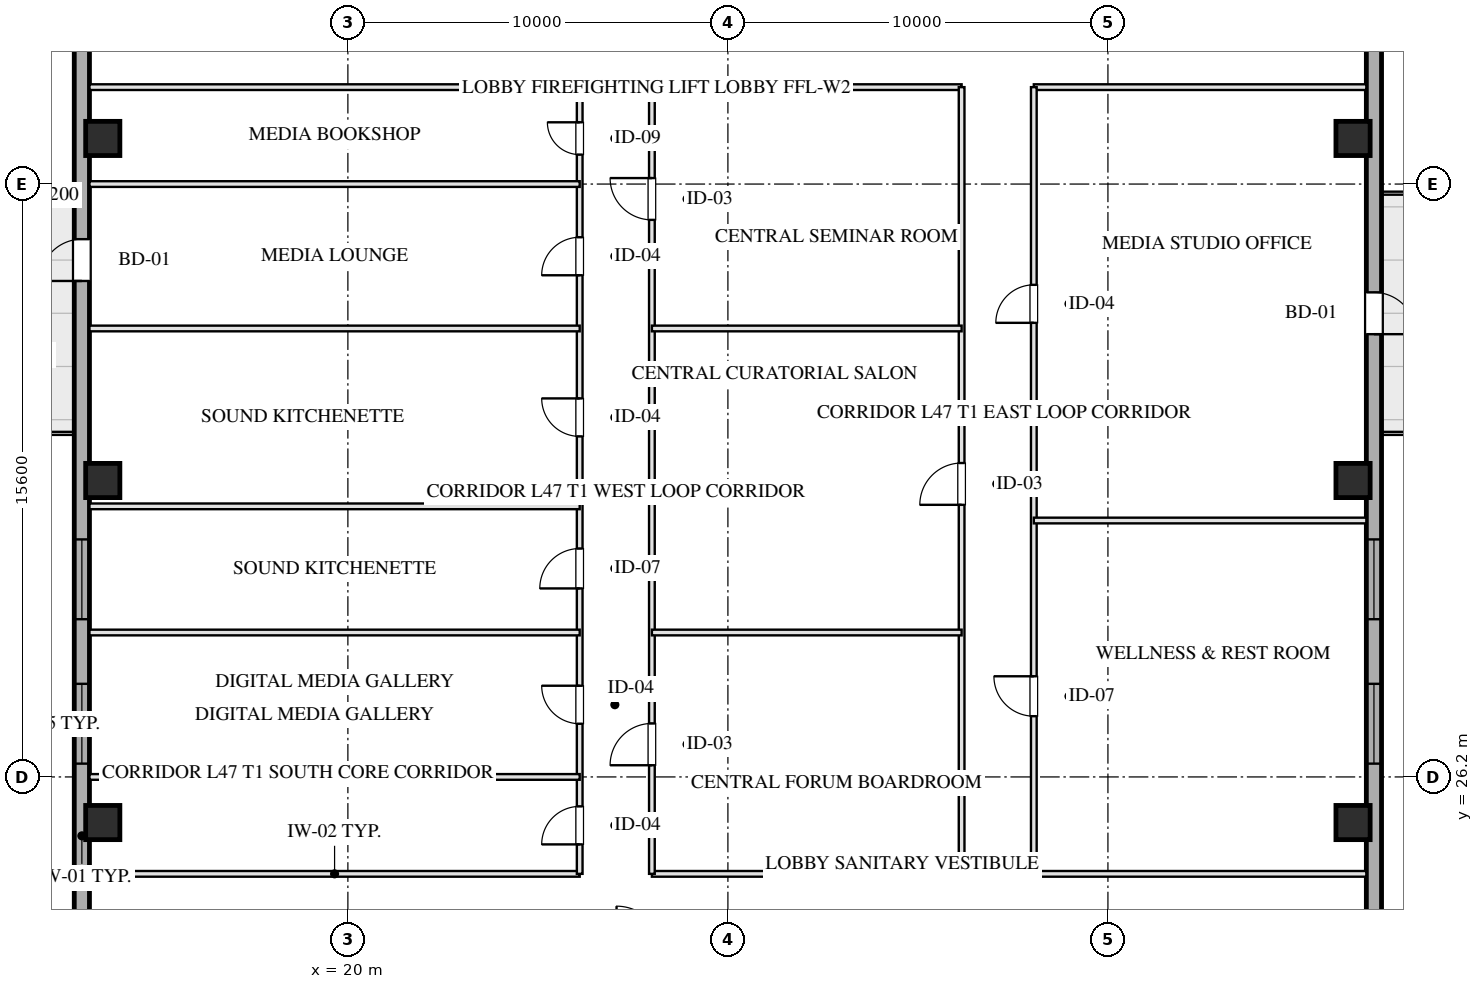
"""IFC4 building model, lengths in metres.
Left out: names, types, materials, properties, quantities, classifications, styles, units other than length and angle.
Written with IfcOpenShell. Run it as: python <this file> out.ifc"""

import sys

from ifc_helpers import new_model, si_unit, direction, frame, frame_2d, origin, origin_2d, place, context, subcontext, project, spatial, rectangle, hollow_rectangle, extrude, element, fill, save


model = new_model("IFC4")
c1 = context("Model", 3, precision=1e-05, world=origin(), true_north=direction((0.0, 1.0)))
c2 = subcontext(c1, "Body", "Model", "MODEL_VIEW")
j1 = project(units=[si_unit("LENGTHUNIT", "METRE"), si_unit("PLANEANGLEUNIT", "RADIAN")], contexts=[c1])
p1 = place(None, origin())
s1 = spatial("IfcSite", under=j1, at=p1, CompositionType="ELEMENT")
p2 = place(p1, origin())
s2 = spatial("IfcBuilding", under=s1, at=p2, CompositionType="ELEMENT")
p3 = place(p2, frame((0.0, 0.0, 177.1)))
s3 = spatial("IfcBuildingStorey", under=s2, at=p3, CompositionType="ELEMENT", Elevation=177.1)
for number, where, z_axis, x_axis in (
    (1, (13.55, 25.0, 0.0), (0.0, 0.0, 1.0), (1.0, 0.0, 0.0)),
    (2, (13.55, 34.0, 0.0), (0.0, 0.0, 1.0), (1.0, 0.0, 0.0)),
    (3, (13.55, 43.0, 0.0), (0.0, 0.0, 1.0), (1.0, 0.0, 0.0)),
    (4, (46.45, 25.0, 0.0), (0.0, 0.0, 1.0), (1.0, 0.0, 0.0)),
    (5, (46.45, 34.0, 0.0), (0.0, 0.0, 1.0), (1.0, 0.0, 0.0)),
    (6, (46.45, 43.0, 0.0), (0.0, 0.0, 1.0), (1.0, 0.0, 0.0)),
):
    element("IfcColumn", number, at=place(p3, frame(where, z_axis=z_axis, x_axis=x_axis)), inside=s3, PredefinedType="COLUMN", context=c2, shape_type="SweptSolid", body=[
        extrude(hollow_rectangle(XDim=0.9, YDim=0.9, WallThickness=0.032, at=origin_2d()), origin(), (0.0, 0.0, 1.0), 3.451),
    ])
p4 = place(p3, frame((13.0, 10.8, 0.0), z_axis=(0.0, 0.0, 1.0), x_axis=(0.0, 1.0, 0.0)))
e7 = element("IfcWall", 7, at=p4, inside=s3, PredefinedType="SOLIDWALL", context=c2, shape_type="SweptSolid", body=[
    extrude(rectangle(XDim=46.4, YDim=0.4, at=frame_2d((23.2, 0.0))), origin(), (0.0, 0.0, 1.0), 2.61),
])
p5 = place(p4, frame((15.75, 0.0, 0.75)))
e8 = element("IfcOpeningElement", 8, at=p5, cuts=e7, PredefinedType="OPENING", context=c2, shape_type="SweptSolid", body=[
    extrude(rectangle(XDim=2.1, YDim=1.46, at=frame_2d((1.05, 0.73))), frame((0.0, 0.21, 0.0), z_axis=(0.0, -1.0, 0.0), x_axis=(1.0, 0.0, 0.0)), (0.0, 0.0, 1.0), 0.42),
])
p6 = place(p4, frame((19.55, 0.0, 0.75)))
e9 = element("IfcOpeningElement", 9, at=p6, cuts=e7, PredefinedType="OPENING", context=c2, shape_type="SweptSolid", body=[
    extrude(rectangle(XDim=2.1, YDim=1.46, at=frame_2d((1.05, 0.73))), frame((0.0, 0.21, 0.0), z_axis=(0.0, -1.0, 0.0), x_axis=(1.0, 0.0, 0.0)), (0.0, 0.0, 1.0), 0.42),
])
p7 = place(p4, frame((28.45, 0.0, 0.0)))
e10 = element("IfcOpeningElement", 10, at=p7, cuts=e7, PredefinedType="OPENING", context=c2, shape_type="SweptSolid", body=[
    extrude(rectangle(XDim=1.1, YDim=2.15, at=frame_2d((0.55, 1.075))), frame((0.0, 0.21, 0.0), z_axis=(0.0, -1.0, 0.0), x_axis=(1.0, 0.0, 0.0)), (0.0, 0.0, 1.0), 0.42),
])
p8 = place(p3, frame((47.0, 57.2, 0.0), z_axis=(0.0, 0.0, 1.0), x_axis=(0.0, -1.0, 0.0)))
e11 = element("IfcWall", 11, at=p8, inside=s3, PredefinedType="SOLIDWALL", context=c2, shape_type="SweptSolid", body=[
    extrude(rectangle(XDim=46.4, YDim=0.4, at=frame_2d((23.2, 0.0))), origin(), (0.0, 0.0, 1.0), 2.61),
])
p9 = place(p8, frame((28.55, 0.0, 0.75)))
e12 = element("IfcOpeningElement", 12, at=p9, cuts=e11, PredefinedType="OPENING", context=c2, shape_type="SweptSolid", body=[
    extrude(rectangle(XDim=2.1, YDim=1.46, at=frame_2d((1.05, 0.73))), frame((0.0, 0.21, 0.0), z_axis=(0.0, -1.0, 0.0), x_axis=(1.0, 0.0, 0.0)), (0.0, 0.0, 1.0), 0.42),
])
p10 = place(p8, frame((24.75, 0.0, 0.75)))
e13 = element("IfcOpeningElement", 13, at=p10, cuts=e11, PredefinedType="OPENING", context=c2, shape_type="SweptSolid", body=[
    extrude(rectangle(XDim=2.1, YDim=1.46, at=frame_2d((1.05, 0.73))), frame((0.0, 0.21, 0.0), z_axis=(0.0, -1.0, 0.0), x_axis=(1.0, 0.0, 0.0)), (0.0, 0.0, 1.0), 0.42),
])
p11 = place(p8, frame((18.25, 0.0, 0.0)))
e14 = element("IfcOpeningElement", 14, at=p11, cuts=e11, PredefinedType="OPENING", context=c2, shape_type="SweptSolid", body=[
    extrude(rectangle(XDim=1.1, YDim=2.15, at=frame_2d((0.55, 1.075))), frame((0.0, 0.21, 0.0), z_axis=(0.0, -1.0, 0.0), x_axis=(1.0, 0.0, 0.0)), (0.0, 0.0, 1.0), 0.42),
])
p12 = place(p3, frame((13.2, 23.65, 0.0), z_axis=(0.0, 0.0, 1.0), x_axis=(1.0, 0.0, 0.0)))
e15 = element("IfcWall", 15, at=p12, inside=s3, PredefinedType="PARTITIONING", context=c2, shape_type="SweptSolid", body=[
    extrude(rectangle(XDim=12.9, YDim=0.15, at=frame_2d((6.45, 0.0))), origin(), (0.0, 0.0, 1.0), 3.175),
])
p13 = place(p3, frame((28.0, 23.65, 0.0), z_axis=(0.0, 0.0, 1.0), x_axis=(1.0, 0.0, 0.0)))
e16 = element("IfcWall", 16, at=p13, inside=s3, PredefinedType="PARTITIONING", context=c2, shape_type="SweptSolid", body=[
    extrude(rectangle(XDim=8.15, YDim=0.15, at=frame_2d((4.075, 0.0))), origin(), (0.0, 0.0, 1.0), 3.175),
])
p14 = place(p3, frame((38.05, 23.65, 0.0), z_axis=(0.0, 0.0, 1.0), x_axis=(1.0, 0.0, 0.0)))
e17 = element("IfcWall", 17, at=p14, inside=s3, PredefinedType="PARTITIONING", context=c2, shape_type="SweptSolid", body=[
    extrude(rectangle(XDim=8.75, YDim=0.15, at=frame_2d((4.375, 0.0))), origin(), (0.0, 0.0, 1.0), 3.175),
])
p15 = place(p3, frame((13.2, 44.35, 0.0), z_axis=(0.0, 0.0, 1.0), x_axis=(1.0, 0.0, 0.0)))
e18 = element("IfcWall", 18, at=p15, inside=s3, PredefinedType="PARTITIONING", context=c2, shape_type="SweptSolid", body=[
    extrude(rectangle(XDim=12.9, YDim=0.15, at=frame_2d((6.45, 0.0))), origin(), (0.0, 0.0, 1.0), 3.175),
])
p16 = place(p3, frame((28.0, 44.35, 0.0), z_axis=(0.0, 0.0, 1.0), x_axis=(1.0, 0.0, 0.0)))
e19 = element("IfcWall", 19, at=p16, inside=s3, PredefinedType="PARTITIONING", context=c2, shape_type="SweptSolid", body=[
    extrude(rectangle(XDim=8.15, YDim=0.15, at=frame_2d((4.075, 0.0))), origin(), (0.0, 0.0, 1.0), 3.175),
])
p17 = place(p3, frame((38.05, 44.35, 0.0), z_axis=(0.0, 0.0, 1.0), x_axis=(1.0, 0.0, 0.0)))
e20 = element("IfcWall", 20, at=p17, inside=s3, PredefinedType="PARTITIONING", context=c2, shape_type="SweptSolid", body=[
    extrude(rectangle(XDim=8.75, YDim=0.15, at=frame_2d((4.375, 0.0))), origin(), (0.0, 0.0, 1.0), 3.175),
])
p18 = place(p3, frame((26.1, 23.65, 0.0), z_axis=(0.0, 0.0, 1.0), x_axis=(0.0, 1.0, 0.0)))
e21 = element("IfcWall", 21, at=p18, inside=s3, PredefinedType="PARTITIONING", context=c2, shape_type="SweptSolid", body=[
    extrude(rectangle(XDim=20.7, YDim=0.15, at=frame_2d((10.35, 0.0))), origin(), (0.0, 0.0, 1.0), 3.175),
])
p19 = place(p18, frame((0.775, 0.0, 0.0)))
e22 = element("IfcOpeningElement", 22, at=p19, cuts=e21, PredefinedType="OPENING", context=c2, shape_type="SweptSolid", body=[
    extrude(rectangle(XDim=1.0, YDim=2.05, at=frame_2d((0.5, 1.025))), frame((0.0, 0.085, 0.0), z_axis=(0.0, -1.0, 0.0), x_axis=(1.0, 0.0, 0.0)), (0.0, 0.0, 1.0), 0.17),
])
p20 = place(p18, frame((3.95, 0.0, 0.0)))
e23 = element("IfcOpeningElement", 23, at=p20, cuts=e21, PredefinedType="OPENING", context=c2, shape_type="SweptSolid", body=[
    extrude(rectangle(XDim=1.0, YDim=2.05, at=frame_2d((0.5, 1.025))), frame((0.0, 0.085, 0.0), z_axis=(0.0, -1.0, 0.0), x_axis=(1.0, 0.0, 0.0)), (0.0, 0.0, 1.0), 0.17),
])
p21 = place(p18, frame((7.51, 0.0, 0.0)))
e24 = element("IfcOpeningElement", 24, at=p21, cuts=e21, PredefinedType="OPENING", context=c2, shape_type="SweptSolid", body=[
    extrude(rectangle(XDim=1.05, YDim=2.05, at=frame_2d((0.525, 1.025))), frame((0.0, 0.085, 0.0), z_axis=(0.0, -1.0, 0.0), x_axis=(1.0, 0.0, 0.0)), (0.0, 0.0, 1.0), 0.17),
])
p22 = place(p18, frame((11.51, 0.0, 0.0)))
e25 = element("IfcOpeningElement", 25, at=p22, cuts=e21, PredefinedType="OPENING", context=c2, shape_type="SweptSolid", body=[
    extrude(rectangle(XDim=1.0, YDim=2.05, at=frame_2d((0.5, 1.025))), frame((0.0, 0.085, 0.0), z_axis=(0.0, -1.0, 0.0), x_axis=(1.0, 0.0, 0.0)), (0.0, 0.0, 1.0), 0.17),
])
p23 = place(p18, frame((15.75, 0.0, 0.0)))
e26 = element("IfcOpeningElement", 26, at=p23, cuts=e21, PredefinedType="OPENING", context=c2, shape_type="SweptSolid", body=[
    extrude(rectangle(XDim=1.0, YDim=2.05, at=frame_2d((0.5, 1.025))), frame((0.0, 0.085, 0.0), z_axis=(0.0, -1.0, 0.0), x_axis=(1.0, 0.0, 0.0)), (0.0, 0.0, 1.0), 0.17),
])
p24 = place(p18, frame((18.925, 0.0, 0.0)))
e27 = element("IfcOpeningElement", 27, at=p24, cuts=e21, PredefinedType="OPENING", context=c2, shape_type="SweptSolid", body=[
    extrude(rectangle(XDim=0.85, YDim=2.05, at=frame_2d((0.425, 1.025))), frame((0.0, 0.085, 0.0), z_axis=(0.0, -1.0, 0.0), x_axis=(1.0, 0.0, 0.0)), (0.0, 0.0, 1.0), 0.17),
])
p25 = place(p3, frame((28.0, 23.65, 0.0), z_axis=(0.0, 0.0, 1.0), x_axis=(0.0, 1.0, 0.0)))
e28 = element("IfcWall", 28, at=p25, inside=s3, PredefinedType="PARTITIONING", context=c2, shape_type="SweptSolid", body=[
    extrude(rectangle(XDim=20.7, YDim=0.15, at=frame_2d((10.35, 0.0))), origin(), (0.0, 0.0, 1.0), 3.175),
])
p26 = place(p25, frame((2.857, 0.0, 0.0)))
e29 = element("IfcOpeningElement", 29, at=p26, cuts=e28, PredefinedType="OPENING", context=c2, shape_type="SweptSolid", body=[
    extrude(rectangle(XDim=1.1, YDim=2.05, at=frame_2d((0.55, 1.025))), frame((0.0, 0.085, 0.0), z_axis=(0.0, -1.0, 0.0), x_axis=(1.0, 0.0, 0.0)), (0.0, 0.0, 1.0), 0.17),
])
p27 = place(p25, frame((17.208, 0.0, 0.0)))
e30 = element("IfcOpeningElement", 30, at=p27, cuts=e28, PredefinedType="OPENING", context=c2, shape_type="SweptSolid", body=[
    extrude(rectangle(XDim=1.1, YDim=2.05, at=frame_2d((0.55, 1.025))), frame((0.0, 0.085, 0.0), z_axis=(0.0, -1.0, 0.0), x_axis=(1.0, 0.0, 0.0)), (0.0, 0.0, 1.0), 0.17),
])
p28 = place(p3, frame((36.15, 23.65, 0.0), z_axis=(0.0, 0.0, 1.0), x_axis=(0.0, 1.0, 0.0)))
e31 = element("IfcWall", 31, at=p28, inside=s3, PredefinedType="PARTITIONING", context=c2, shape_type="SweptSolid", body=[
    extrude(rectangle(XDim=20.7, YDim=0.15, at=frame_2d((10.35, 0.0))), origin(), (0.0, 0.0, 1.0), 3.175),
])
p29 = place(p28, frame((9.71, 0.0, 0.0)))
e32 = element("IfcOpeningElement", 32, at=p29, cuts=e31, PredefinedType="OPENING", context=c2, shape_type="SweptSolid", body=[
    extrude(rectangle(XDim=1.1, YDim=2.05, at=frame_2d((0.55, 1.025))), frame((0.0, 0.085, 0.0), z_axis=(0.0, -1.0, 0.0), x_axis=(1.0, 0.0, 0.0)), (0.0, 0.0, 1.0), 0.17),
])
p30 = place(p3, frame((38.05, 23.65, 0.0), z_axis=(0.0, 0.0, 1.0), x_axis=(0.0, 1.0, 0.0)))
e33 = element("IfcWall", 33, at=p30, inside=s3, PredefinedType="PARTITIONING", context=c2, shape_type="SweptSolid", body=[
    extrude(rectangle(XDim=20.7, YDim=0.15, at=frame_2d((10.35, 0.0))), origin(), (0.0, 0.0, 1.0), 3.175),
])
p31 = place(p30, frame((4.148, 0.0, 0.0)))
e34 = element("IfcOpeningElement", 34, at=p31, cuts=e33, PredefinedType="OPENING", context=c2, shape_type="SweptSolid", body=[
    extrude(rectangle(XDim=1.05, YDim=2.05, at=frame_2d((0.525, 1.025))), frame((0.0, 0.085, 0.0), z_axis=(0.0, -1.0, 0.0), x_axis=(1.0, 0.0, 0.0)), (0.0, 0.0, 1.0), 0.17),
])
p32 = place(p30, frame((14.499, 0.0, 0.0)))
e35 = element("IfcOpeningElement", 35, at=p32, cuts=e33, PredefinedType="OPENING", context=c2, shape_type="SweptSolid", body=[
    extrude(rectangle(XDim=1.0, YDim=2.05, at=frame_2d((0.5, 1.025))), frame((0.0, 0.085, 0.0), z_axis=(0.0, -1.0, 0.0), x_axis=(1.0, 0.0, 0.0)), (0.0, 0.0, 1.0), 0.17),
])
for number, where, z_axis, x_axis in (
    (36, (28.0, 30.0, 0.0), (0.0, 0.0, 1.0), (1.0, 0.0, 0.0)),
    (37, (28.0, 38.0, 0.0), (0.0, 0.0, 1.0), (1.0, 0.0, 0.0)),
):
    element("IfcWall", number, at=place(p3, frame(where, z_axis=z_axis, x_axis=x_axis)), inside=s3, PredefinedType="PARTITIONING", context=c2, shape_type="SweptSolid", body=[
        extrude(rectangle(XDim=8.15, YDim=0.15, at=frame_2d((4.075, 0.0))), origin(), (0.0, 0.0, 1.0), 3.175),
    ])
for number, where, z_axis, x_axis in (
    (38, (13.2, 26.2, 0.0), (0.0, 0.0, 1.0), (1.0, 0.0, 0.0)),
    (39, (13.2, 30.0, 0.0), (0.0, 0.0, 1.0), (1.0, 0.0, 0.0)),
    (40, (13.2, 33.32, 0.0), (0.0, 0.0, 1.0), (1.0, 0.0, 0.0)),
    (41, (13.2, 38.0, 0.0), (0.0, 0.0, 1.0), (1.0, 0.0, 0.0)),
    (42, (13.2, 41.8, 0.0), (0.0, 0.0, 1.0), (1.0, 0.0, 0.0)),
):
    element("IfcWall", number, at=place(p3, frame(where, z_axis=z_axis, x_axis=x_axis)), inside=s3, PredefinedType="PARTITIONING", context=c2, shape_type="SweptSolid", body=[
        extrude(rectangle(XDim=12.9, YDim=0.15, at=frame_2d((6.45, 0.0))), origin(), (0.0, 0.0, 1.0), 3.175),
    ])
p33 = place(p3, frame((38.05, 32.947, 0.0), z_axis=(0.0, 0.0, 1.0), x_axis=(1.0, 0.0, 0.0)))
e43 = element("IfcWall", 43, at=p33, inside=s3, PredefinedType="PARTITIONING", context=c2, shape_type="SweptSolid", body=[
    extrude(rectangle(XDim=8.75, YDim=0.15, at=frame_2d((4.375, 0.0))), origin(), (0.0, 0.0, 1.0), 3.175),
])
p34 = place(p5, origin())
e44 = element("IfcWindow", 44, at=p34, inside=s3, PartitioningType="TRIPLE_PANEL_VERTICAL", PredefinedType="WINDOW", context=c2, shape_type="SweptSolid", body=[
    extrude(rectangle(XDim=2.1, YDim=1.46, at=frame_2d((1.05, 0.73))), frame((0.0, 0.03, 0.0), z_axis=(0.0, -1.0, 0.0), x_axis=(1.0, 0.0, 0.0)), (0.0, 0.0, 1.0), 0.06),
])
fill(e8, e44)
p35 = place(p6, origin())
e45 = element("IfcWindow", 45, at=p35, inside=s3, PartitioningType="TRIPLE_PANEL_VERTICAL", PredefinedType="WINDOW", context=c2, shape_type="SweptSolid", body=[
    extrude(rectangle(XDim=2.1, YDim=1.46, at=frame_2d((1.05, 0.73))), frame((0.0, 0.03, 0.0), z_axis=(0.0, -1.0, 0.0), x_axis=(1.0, 0.0, 0.0)), (0.0, 0.0, 1.0), 0.06),
])
fill(e9, e45)
p36 = place(p9, origin())
e46 = element("IfcWindow", 46, at=p36, inside=s3, PartitioningType="TRIPLE_PANEL_VERTICAL", PredefinedType="WINDOW", context=c2, shape_type="SweptSolid", body=[
    extrude(rectangle(XDim=2.1, YDim=1.46, at=frame_2d((1.05, 0.73))), frame((0.0, 0.03, 0.0), z_axis=(0.0, -1.0, 0.0), x_axis=(1.0, 0.0, 0.0)), (0.0, 0.0, 1.0), 0.06),
])
fill(e12, e46)
p37 = place(p10, origin())
e47 = element("IfcWindow", 47, at=p37, inside=s3, PartitioningType="TRIPLE_PANEL_VERTICAL", PredefinedType="WINDOW", context=c2, shape_type="SweptSolid", body=[
    extrude(rectangle(XDim=2.1, YDim=1.46, at=frame_2d((1.05, 0.73))), frame((0.0, 0.03, 0.0), z_axis=(0.0, -1.0, 0.0), x_axis=(1.0, 0.0, 0.0)), (0.0, 0.0, 1.0), 0.06),
])
fill(e13, e47)
p38 = place(p7, origin())
e48 = element("IfcDoor", 48, at=p38, inside=s3, OperationType="SINGLE_SWING_LEFT", PredefinedType="DOOR", context=c2, shape_type="SweptSolid", body=[
    extrude(rectangle(XDim=1.1, YDim=2.15, at=frame_2d((0.55, 1.075))), frame((0.0, 0.025, 0.0), z_axis=(0.0, -1.0, 0.0), x_axis=(1.0, 0.0, 0.0)), (0.0, 0.0, 1.0), 0.05),
])
fill(e10, e48)
p39 = place(p11, origin())
e49 = element("IfcDoor", 49, at=p39, inside=s3, OperationType="SINGLE_SWING_RIGHT", PredefinedType="DOOR", context=c2, shape_type="SweptSolid", body=[
    extrude(rectangle(XDim=1.1, YDim=2.15, at=frame_2d((0.55, 1.075))), frame((0.0, 0.025, 0.0), z_axis=(0.0, -1.0, 0.0), x_axis=(1.0, 0.0, 0.0)), (0.0, 0.0, 1.0), 0.05),
])
fill(e14, e49)
p40 = place(p19, origin())
e50 = element("IfcDoor", 50, at=p40, inside=s3, OperationType="SINGLE_SWING_LEFT", PredefinedType="DOOR", context=c2, shape_type="SweptSolid", body=[
    extrude(rectangle(XDim=1.0, YDim=2.05, at=frame_2d((0.5, 1.025))), frame((0.0, 0.025, 0.0), z_axis=(0.0, -1.0, 0.0), x_axis=(1.0, 0.0, 0.0)), (0.0, 0.0, 1.0), 0.05),
])
fill(e22, e50)
p41 = place(p20, origin())
e51 = element("IfcDoor", 51, at=p41, inside=s3, OperationType="SINGLE_SWING_RIGHT", PredefinedType="DOOR", context=c2, shape_type="SweptSolid", body=[
    extrude(rectangle(XDim=1.0, YDim=2.05, at=frame_2d((0.5, 1.025))), frame((0.0, 0.025, 0.0), z_axis=(0.0, -1.0, 0.0), x_axis=(1.0, 0.0, 0.0)), (0.0, 0.0, 1.0), 0.05),
])
fill(e23, e51)
p42 = place(p21, origin())
e52 = element("IfcDoor", 52, at=p42, inside=s3, OperationType="SINGLE_SWING_LEFT", PredefinedType="DOOR", context=c2, shape_type="SweptSolid", body=[
    extrude(rectangle(XDim=1.05, YDim=2.05, at=frame_2d((0.525, 1.025))), frame((0.0, 0.025, 0.0), z_axis=(0.0, -1.0, 0.0), x_axis=(1.0, 0.0, 0.0)), (0.0, 0.0, 1.0), 0.05),
])
fill(e24, e52)
p43 = place(p22, origin())
e53 = element("IfcDoor", 53, at=p43, inside=s3, OperationType="SINGLE_SWING_RIGHT", PredefinedType="DOOR", context=c2, shape_type="SweptSolid", body=[
    extrude(rectangle(XDim=1.0, YDim=2.05, at=frame_2d((0.5, 1.025))), frame((0.0, 0.025, 0.0), z_axis=(0.0, -1.0, 0.0), x_axis=(1.0, 0.0, 0.0)), (0.0, 0.0, 1.0), 0.05),
])
fill(e25, e53)
p44 = place(p23, origin())
e54 = element("IfcDoor", 54, at=p44, inside=s3, OperationType="SINGLE_SWING_LEFT", PredefinedType="DOOR", context=c2, shape_type="SweptSolid", body=[
    extrude(rectangle(XDim=1.0, YDim=2.05, at=frame_2d((0.5, 1.025))), frame((0.0, 0.025, 0.0), z_axis=(0.0, -1.0, 0.0), x_axis=(1.0, 0.0, 0.0)), (0.0, 0.0, 1.0), 0.05),
])
fill(e26, e54)
p45 = place(p24, origin())
e55 = element("IfcDoor", 55, at=p45, inside=s3, OperationType="SINGLE_SWING_RIGHT", PredefinedType="DOOR", context=c2, shape_type="SweptSolid", body=[
    extrude(rectangle(XDim=0.85, YDim=2.05, at=frame_2d((0.425, 1.025))), frame((0.0, 0.025, 0.0), z_axis=(0.0, -1.0, 0.0), x_axis=(1.0, 0.0, 0.0)), (0.0, 0.0, 1.0), 0.05),
])
fill(e27, e55)
p46 = place(p26, origin())
e56 = element("IfcDoor", 56, at=p46, inside=s3, OperationType="SINGLE_SWING_LEFT", PredefinedType="DOOR", context=c2, shape_type="SweptSolid", body=[
    extrude(rectangle(XDim=1.1, YDim=2.05, at=frame_2d((0.55, 1.025))), frame((0.0, 0.025, 0.0), z_axis=(0.0, -1.0, 0.0), x_axis=(1.0, 0.0, 0.0)), (0.0, 0.0, 1.0), 0.05),
])
fill(e29, e56)
p47 = place(p27, origin())
e57 = element("IfcDoor", 57, at=p47, inside=s3, OperationType="SINGLE_SWING_RIGHT", PredefinedType="DOOR", context=c2, shape_type="SweptSolid", body=[
    extrude(rectangle(XDim=1.1, YDim=2.05, at=frame_2d((0.55, 1.025))), frame((0.0, 0.025, 0.0), z_axis=(0.0, -1.0, 0.0), x_axis=(1.0, 0.0, 0.0)), (0.0, 0.0, 1.0), 0.05),
])
fill(e30, e57)
p48 = place(p29, origin())
e58 = element("IfcDoor", 58, at=p48, inside=s3, OperationType="SINGLE_SWING_LEFT", PredefinedType="DOOR", context=c2, shape_type="SweptSolid", body=[
    extrude(rectangle(XDim=1.1, YDim=2.05, at=frame_2d((0.55, 1.025))), frame((0.0, 0.025, 0.0), z_axis=(0.0, -1.0, 0.0), x_axis=(1.0, 0.0, 0.0)), (0.0, 0.0, 1.0), 0.05),
])
fill(e32, e58)
p49 = place(p31, origin())
e59 = element("IfcDoor", 59, at=p49, inside=s3, OperationType="SINGLE_SWING_RIGHT", PredefinedType="DOOR", context=c2, shape_type="SweptSolid", body=[
    extrude(rectangle(XDim=1.05, YDim=2.05, at=frame_2d((0.525, 1.025))), frame((0.0, 0.025, 0.0), z_axis=(0.0, -1.0, 0.0), x_axis=(1.0, 0.0, 0.0)), (0.0, 0.0, 1.0), 0.05),
])
fill(e34, e59)
p50 = place(p32, origin())
e60 = element("IfcDoor", 60, at=p50, inside=s3, OperationType="SINGLE_SWING_LEFT", PredefinedType="DOOR", context=c2, shape_type="SweptSolid", body=[
    extrude(rectangle(XDim=1.0, YDim=2.05, at=frame_2d((0.5, 1.025))), frame((0.0, 0.025, 0.0), z_axis=(0.0, -1.0, 0.0), x_axis=(1.0, 0.0, 0.0)), (0.0, 0.0, 1.0), 0.05),
])
fill(e35, e60)
save(model, sys.argv[1])
